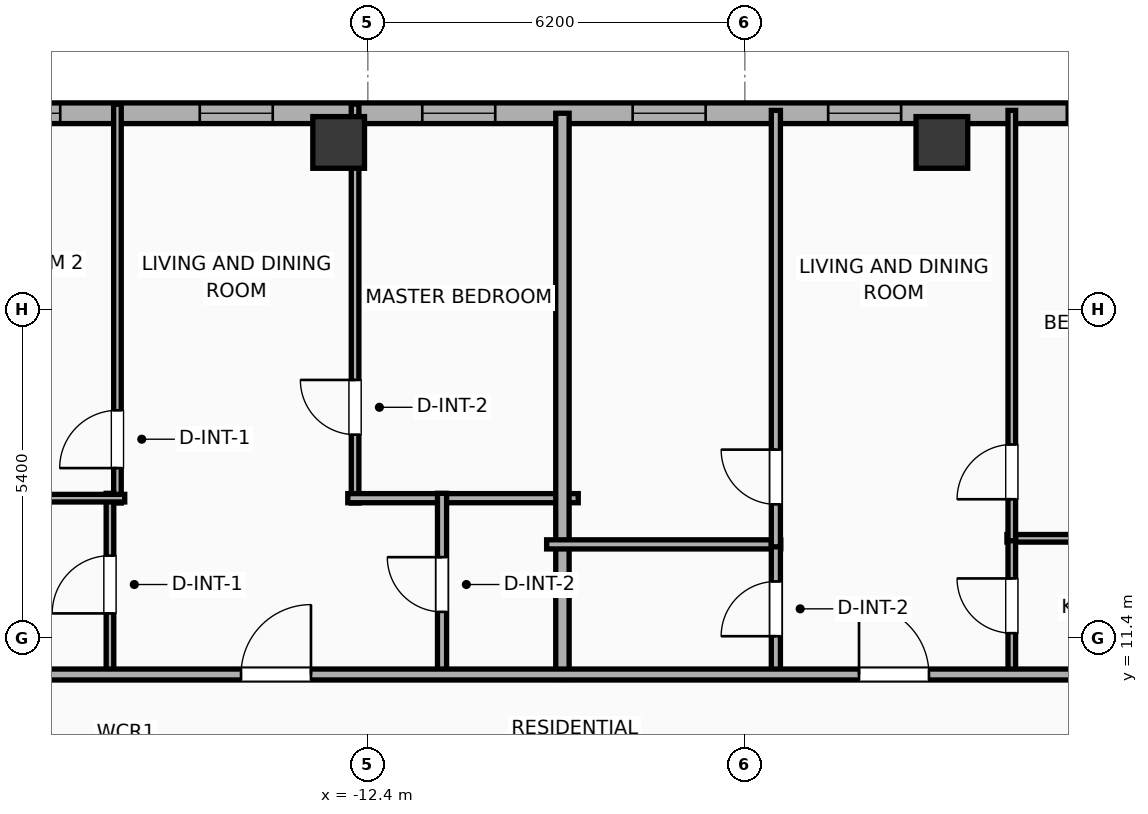
"""IFC4 building model, lengths in metres.
Left out: names, types, materials, properties, quantities, classifications, styles, units other than length and angle.
Written with IfcOpenShell. Run it as: python <this file> out.ifc"""

import sys

from ifc_helpers import new_model, si_unit, direction, frame, frame_2d, origin, origin_2d, place, context, subcontext, project, spatial, rectangle, hollow_rectangle, extrude, element, fill, save


model = new_model("IFC4")
c1 = context("Model", 3, precision=1e-05, world=origin(), true_north=direction((0.0, 1.0)))
c2 = subcontext(c1, "Body", "Model", "MODEL_VIEW")
j1 = project(units=[si_unit("LENGTHUNIT", "METRE"), si_unit("PLANEANGLEUNIT", "RADIAN")], contexts=[c1])
p1 = place(None, origin())
s1 = spatial("IfcSite", under=j1, at=p1, CompositionType="ELEMENT")
p2 = place(p1, origin())
s2 = spatial("IfcBuilding", under=s1, at=p2, CompositionType="ELEMENT")
p3 = place(p2, frame((0.0, 0.0, 219.7)))
s3 = spatial("IfcBuildingStorey", under=s2, at=p3, CompositionType="ELEMENT", Elevation=219.7)
for number, where, z_axis, x_axis in (
    (1, (-2.96, 19.55, 0.0), (0.0, 0.0, 1.0), (1.0, 0.0, 0.0)),
    (2, (-12.88, 19.55, 0.0), (0.0, 0.0, 1.0), (1.0, 0.0, 0.0)),
):
    element("IfcColumn", number, at=place(p3, frame(where, z_axis=z_axis, x_axis=x_axis)), inside=s3, PredefinedType="COLUMN", context=c2, shape_type="SweptSolid", body=[
        extrude(hollow_rectangle(XDim=0.85, YDim=0.85, WallThickness=0.028, at=origin_2d()), origin(), (0.0, 0.0, 1.0), 3.9),
    ])
p4 = place(p3, frame((-22.783, 20.03, 0.0), z_axis=(0.0, 0.0, 1.0), x_axis=(1.0, 0.0, 0.0)))
e3 = element("IfcWall", 3, at=p4, inside=s3, PredefinedType="ELEMENTEDWALL", context=c2, shape_type="SweptSolid", body=[
    extrude(rectangle(XDim=49.566, YDim=0.34, at=frame_2d((24.783, 0.0))), origin(), (0.0, 0.0, 1.0), 3.65),
])
p5 = place(p4, frame((40.956, 0.0, 0.75)))
e4 = element("IfcOpeningElement", 4, at=p5, cuts=e3, PredefinedType="OPENING", context=c2, shape_type="SweptSolid", body=[
    extrude(rectangle(XDim=2.4, YDim=2.1, at=frame_2d((1.2, 1.05))), frame((0.0, 0.18, 0.0), z_axis=(0.0, -1.0, 0.0), x_axis=(1.0, 0.0, 0.0)), (0.0, 0.0, 1.0), 0.36),
])
p6 = place(p4, frame((1.437, 0.0, 0.75)))
e5 = element("IfcOpeningElement", 5, at=p6, cuts=e3, PredefinedType="OPENING", context=c2, shape_type="SweptSolid", body=[
    extrude(rectangle(XDim=1.2, YDim=2.05, at=frame_2d((0.6, 1.025))), frame((0.0, 0.18, 0.0), z_axis=(0.0, -1.0, 0.0), x_axis=(1.0, 0.0, 0.0)), (0.0, 0.0, 1.0), 0.36),
])
p7 = place(p4, frame((7.619, 0.0, 0.75)))
e6 = element("IfcOpeningElement", 6, at=p7, cuts=e3, PredefinedType="OPENING", context=c2, shape_type="SweptSolid", body=[
    extrude(rectangle(XDim=1.2, YDim=2.05, at=frame_2d((0.6, 1.025))), frame((0.0, 0.18, 0.0), z_axis=(0.0, -1.0, 0.0), x_axis=(1.0, 0.0, 0.0)), (0.0, 0.0, 1.0), 0.36),
])
p8 = place(p4, frame((4.124, 0.0, 0.75)))
e7 = element("IfcOpeningElement", 7, at=p8, cuts=e3, PredefinedType="OPENING", context=c2, shape_type="SweptSolid", body=[
    extrude(rectangle(XDim=1.2, YDim=2.05, at=frame_2d((0.6, 1.025))), frame((0.0, 0.18, 0.0), z_axis=(0.0, -1.0, 0.0), x_axis=(1.0, 0.0, 0.0)), (0.0, 0.0, 1.0), 0.36),
])
p9 = place(p4, frame((11.278, 0.0, 0.75)))
e8 = element("IfcOpeningElement", 8, at=p9, cuts=e3, PredefinedType="OPENING", context=c2, shape_type="SweptSolid", body=[
    extrude(rectangle(XDim=1.2, YDim=2.05, at=frame_2d((0.6, 1.025))), frame((0.0, 0.18, 0.0), z_axis=(0.0, -1.0, 0.0), x_axis=(1.0, 0.0, 0.0)), (0.0, 0.0, 1.0), 0.36),
])
p10 = place(p4, frame((17.953, 0.0, 0.75)))
e9 = element("IfcOpeningElement", 9, at=p10, cuts=e3, PredefinedType="OPENING", context=c2, shape_type="SweptSolid", body=[
    extrude(rectangle(XDim=1.2, YDim=2.05, at=frame_2d((0.6, 1.025))), frame((0.0, 0.18, 0.0), z_axis=(0.0, -1.0, 0.0), x_axis=(1.0, 0.0, 0.0)), (0.0, 0.0, 1.0), 0.36),
])
p11 = place(p4, frame((14.738, 0.0, 0.75)))
e10 = element("IfcOpeningElement", 10, at=p11, cuts=e3, PredefinedType="OPENING", context=c2, shape_type="SweptSolid", body=[
    extrude(rectangle(XDim=1.2, YDim=2.05, at=frame_2d((0.6, 1.025))), frame((0.0, 0.18, 0.0), z_axis=(0.0, -1.0, 0.0), x_axis=(1.0, 0.0, 0.0)), (0.0, 0.0, 1.0), 0.36),
])
p12 = place(p4, frame((21.878, 0.0, 0.75)))
e11 = element("IfcOpeningElement", 11, at=p12, cuts=e3, PredefinedType="OPENING", context=c2, shape_type="SweptSolid", body=[
    extrude(rectangle(XDim=1.2, YDim=2.05, at=frame_2d((0.6, 1.025))), frame((0.0, 0.18, 0.0), z_axis=(0.0, -1.0, 0.0), x_axis=(1.0, 0.0, 0.0)), (0.0, 0.0, 1.0), 0.36),
])
p13 = place(p4, frame((27.878, 0.0, 0.75)))
e12 = element("IfcOpeningElement", 12, at=p13, cuts=e3, PredefinedType="OPENING", context=c2, shape_type="SweptSolid", body=[
    extrude(rectangle(XDim=1.2, YDim=2.05, at=frame_2d((0.6, 1.025))), frame((0.0, 0.18, 0.0), z_axis=(0.0, -1.0, 0.0), x_axis=(1.0, 0.0, 0.0)), (0.0, 0.0, 1.0), 0.36),
])
p14 = place(p4, frame((24.863, 0.0, 0.75)))
e13 = element("IfcOpeningElement", 13, at=p14, cuts=e3, PredefinedType="OPENING", context=c2, shape_type="SweptSolid", body=[
    extrude(rectangle(XDim=1.2, YDim=2.05, at=frame_2d((0.6, 1.025))), frame((0.0, 0.18, 0.0), z_axis=(0.0, -1.0, 0.0), x_axis=(1.0, 0.0, 0.0)), (0.0, 0.0, 1.0), 0.36),
])
p15 = place(p4, frame((32.078, 0.0, 0.75)))
e14 = element("IfcOpeningElement", 14, at=p15, cuts=e3, PredefinedType="OPENING", context=c2, shape_type="SweptSolid", body=[
    extrude(rectangle(XDim=1.2, YDim=2.05, at=frame_2d((0.6, 1.025))), frame((0.0, 0.18, 0.0), z_axis=(0.0, -1.0, 0.0), x_axis=(1.0, 0.0, 0.0)), (0.0, 0.0, 1.0), 0.36),
])
p16 = place(p4, frame((35.216, 0.0, 0.75)))
e15 = element("IfcOpeningElement", 15, at=p16, cuts=e3, PredefinedType="OPENING", context=c2, shape_type="SweptSolid", body=[
    extrude(rectangle(XDim=1.2, YDim=2.05, at=frame_2d((0.6, 1.025))), frame((0.0, 0.18, 0.0), z_axis=(0.0, -1.0, 0.0), x_axis=(1.0, 0.0, 0.0)), (0.0, 0.0, 1.0), 0.36),
])
p17 = place(p4, frame((45.73, 0.0, 0.75)))
e16 = element("IfcOpeningElement", 16, at=p17, cuts=e3, PredefinedType="OPENING", context=c2, shape_type="SweptSolid", body=[
    extrude(rectangle(XDim=1.2, YDim=2.05, at=frame_2d((0.6, 1.025))), frame((0.0, 0.18, 0.0), z_axis=(0.0, -1.0, 0.0), x_axis=(1.0, 0.0, 0.0)), (0.0, 0.0, 1.0), 0.36),
])
p18 = place(p3, frame((-16.518, 13.62, 0.0), z_axis=(0.0, 0.0, 1.0), x_axis=(0.0, 1.0, 0.0)))
e17 = element("IfcWall", 17, at=p18, inside=s3, PredefinedType="PARTITIONING", context=c2, shape_type="SweptSolid", body=[
    extrude(rectangle(XDim=6.56, YDim=0.125, at=frame_2d((3.28, 0.0))), origin(), (0.0, 0.0, 1.0), 3.65),
])
p19 = place(p18, frame((0.575, 0.0, 0.0)))
e18 = element("IfcOpeningElement", 18, at=p19, cuts=e17, PredefinedType="OPENING", context=c2, shape_type="SweptSolid", body=[
    extrude(rectangle(XDim=0.95, YDim=2.05, at=frame_2d((0.475, 1.025))), frame((0.0, 0.073, 0.0), z_axis=(0.0, -1.0, 0.0), x_axis=(1.0, 0.0, 0.0)), (0.0, 0.0, 1.0), 0.145),
])
p20 = place(p3, frame((-12.61, 13.62, 0.0), z_axis=(0.0, 0.0, 1.0), x_axis=(0.0, 1.0, 0.0)))
e19 = element("IfcWall", 19, at=p20, inside=s3, PredefinedType="PARTITIONING", context=c2, shape_type="SweptSolid", body=[
    extrude(rectangle(XDim=6.56, YDim=0.125, at=frame_2d((3.28, 0.0))), origin(), (0.0, 0.0, 1.0), 3.09),
])
p21 = place(p20, frame((1.125, 0.0, 0.0)))
e20 = element("IfcOpeningElement", 20, at=p21, cuts=e19, PredefinedType="OPENING", context=c2, shape_type="SweptSolid", body=[
    extrude(rectangle(XDim=0.9, YDim=2.05, at=frame_2d((0.45, 1.025))), frame((0.0, 0.073, 0.0), z_axis=(0.0, -1.0, 0.0), x_axis=(1.0, 0.0, 0.0)), (0.0, 0.0, 1.0), 0.145),
])
p22 = place(p3, frame((-12.73, 13.7, 0.0), z_axis=(0.0, 0.0, 1.0), x_axis=(1.0, 0.0, 0.0)))
e21 = element("IfcWall", 21, at=p22, inside=s3, PredefinedType="PLUMBINGWALL", context=c2, shape_type="SweptSolid", body=[
    extrude(rectangle(XDim=3.79, YDim=0.15, at=frame_2d((1.895, 0.0))), origin(), (0.0, 0.0, 1.0), 3.65),
])
p23 = place(p3, frame((-16.641, 10.78, 0.0), z_axis=(0.0, 0.0, 1.0), x_axis=(0.0, 1.0, 0.0)))
e22 = element("IfcWall", 22, at=p23, inside=s3, PredefinedType="PARTITIONING", context=c2, shape_type="SweptSolid", body=[
    extrude(rectangle(XDim=3.0, YDim=0.125, at=frame_2d((1.5, 0.0))), origin(), (0.0, 0.0, 1.0), 3.65),
])
p24 = place(p23, frame((1.025, 0.0, 0.0)))
e23 = element("IfcOpeningElement", 23, at=p24, cuts=e22, PredefinedType="OPENING", context=c2, shape_type="SweptSolid", body=[
    extrude(rectangle(XDim=0.95, YDim=2.05, at=frame_2d((0.475, 1.025))), frame((0.0, 0.073, 0.0), z_axis=(0.0, -1.0, 0.0), x_axis=(1.0, 0.0, 0.0)), (0.0, 0.0, 1.0), 0.145),
])
p25 = place(p3, frame((-19.86, 13.7, 0.0), z_axis=(0.0, 0.0, 1.0), x_axis=(1.0, 0.0, 0.0)))
e24 = element("IfcWall", 24, at=p25, inside=s3, PredefinedType="PARTITIONING", context=c2, shape_type="SweptSolid", body=[
    extrude(rectangle(XDim=3.462, YDim=0.125, at=frame_2d((1.731, 0.0))), origin(), (0.0, 0.0, 1.0), 3.65),
])
p26 = place(p3, frame((-11.18, 10.78, 0.0), z_axis=(0.0, 0.0, 1.0), x_axis=(0.0, 1.0, 0.0)))
e25 = element("IfcWall", 25, at=p26, inside=s3, PredefinedType="PLUMBINGWALL", context=c2, shape_type="SweptSolid", body=[
    extrude(rectangle(XDim=3.0, YDim=0.15, at=frame_2d((1.5, 0.0))), origin(), (0.0, 0.0, 1.0), 3.65),
])
p27 = place(p26, frame((1.05, 0.0, 0.0)))
e26 = element("IfcOpeningElement", 26, at=p27, cuts=e25, PredefinedType="OPENING", context=c2, shape_type="SweptSolid", body=[
    extrude(rectangle(XDim=0.9, YDim=2.05, at=frame_2d((0.45, 1.025))), frame((0.0, 0.085, 0.0), z_axis=(0.0, -1.0, 0.0), x_axis=(1.0, 0.0, 0.0)), (0.0, 0.0, 1.0), 0.17),
])
p28 = place(p3, frame((-9.2, 10.72, 0.0), z_axis=(0.0, 0.0, 1.0), x_axis=(0.0, 1.0, 0.0)))
e27 = element("IfcWall", 27, at=p28, inside=s3, PredefinedType="PARTITIONING", context=c2, shape_type="SweptSolid", body=[
    extrude(rectangle(XDim=9.31, YDim=0.22, at=frame_2d((4.655, 0.0))), origin(), (0.0, 0.0, 1.0), 3.65),
])
p29 = place(p3, frame((-9.46, 12.94, 0.0), z_axis=(0.0, 0.0, 1.0), x_axis=(1.0, 0.0, 0.0)))
e28 = element("IfcWall", 28, at=p29, inside=s3, PredefinedType="PLUMBINGWALL", context=c2, shape_type="SweptSolid", body=[
    extrude(rectangle(XDim=3.85, YDim=0.15, at=frame_2d((1.925, 0.0))), origin(), (0.0, 0.0, 1.0), 3.65),
])
p30 = place(p3, frame((-1.89, 13.04, 0.0), z_axis=(0.0, 0.0, 1.0), x_axis=(1.0, 0.0, 0.0)))
e29 = element("IfcWall", 29, at=p30, inside=s3, PredefinedType="PARTITIONING", context=c2, shape_type="SweptSolid", body=[
    extrude(rectangle(XDim=3.35, YDim=0.125, at=frame_2d((1.675, 0.0))), origin(), (0.0, 0.0, 1.0), 3.65),
])
p31 = place(p3, frame((-5.69, 10.78, 0.0), z_axis=(0.0, 0.0, 1.0), x_axis=(0.0, 1.0, 0.0)))
e30 = element("IfcWall", 30, at=p31, inside=s3, PredefinedType="PLUMBINGWALL", context=c2, shape_type="SweptSolid", body=[
    extrude(rectangle(XDim=2.2, YDim=0.15, at=frame_2d((1.1, 0.0))), origin(), (0.0, 0.0, 1.0), 3.65),
])
p32 = place(p31, frame((0.65, 0.0, 0.0)))
e31 = element("IfcOpeningElement", 31, at=p32, cuts=e30, PredefinedType="OPENING", context=c2, shape_type="SweptSolid", body=[
    extrude(rectangle(XDim=0.9, YDim=2.05, at=frame_2d((0.45, 1.025))), frame((0.0, 0.085, 0.0), z_axis=(0.0, -1.0, 0.0), x_axis=(1.0, 0.0, 0.0)), (0.0, 0.0, 1.0), 0.17),
])
p33 = place(p3, frame((-5.69, 12.9, 0.0), z_axis=(0.0, 0.0, 1.0), x_axis=(0.0, 1.0, 0.0)))
e32 = element("IfcWall", 32, at=p33, inside=s3, PredefinedType="PLUMBINGWALL", context=c2, shape_type="SweptSolid", body=[
    extrude(rectangle(XDim=7.177, YDim=0.15, at=frame_2d((3.588, 0.0))), origin(), (0.0, 0.0, 1.0), 3.65),
])
p34 = place(p33, frame((0.698, 0.0, 0.0)))
e33 = element("IfcOpeningElement", 33, at=p34, cuts=e32, PredefinedType="OPENING", context=c2, shape_type="SweptSolid", body=[
    extrude(rectangle(XDim=0.9, YDim=2.05, at=frame_2d((0.45, 1.025))), frame((0.0, 0.085, 0.0), z_axis=(0.0, -1.0, 0.0), x_axis=(1.0, 0.0, 0.0)), (0.0, 0.0, 1.0), 0.17),
])
p35 = place(p3, frame((-1.81, 10.78, 0.0), z_axis=(0.0, 0.0, 1.0), x_axis=(0.0, 1.0, 0.0)))
e34 = element("IfcWall", 34, at=p35, inside=s3, PredefinedType="PARTITIONING", context=c2, shape_type="SweptSolid", body=[
    extrude(rectangle(XDim=2.3, YDim=0.125, at=frame_2d((1.15, 0.0))), origin(), (0.0, 0.0, 1.0), 3.65),
])
p36 = place(p35, frame((0.7, 0.0, 0.0)))
e35 = element("IfcOpeningElement", 35, at=p36, cuts=e34, PredefinedType="OPENING", context=c2, shape_type="SweptSolid", body=[
    extrude(rectangle(XDim=0.9, YDim=2.05, at=frame_2d((0.45, 1.025))), frame((0.0, 0.073, 0.0), z_axis=(0.0, -1.0, 0.0), x_axis=(1.0, 0.0, 0.0)), (0.0, 0.0, 1.0), 0.145),
])
p37 = place(p3, frame((-1.81, 13.0, 0.0), z_axis=(0.0, 0.0, 1.0), x_axis=(0.0, 1.0, 0.0)))
e36 = element("IfcWall", 36, at=p37, inside=s3, PredefinedType="PARTITIONING", context=c2, shape_type="SweptSolid", body=[
    extrude(rectangle(XDim=7.077, YDim=0.125, at=frame_2d((3.539, 0.0))), origin(), (0.0, 0.0, 1.0), 3.65),
])
p38 = place(p37, frame((0.682, 0.0, 0.0)))
e37 = element("IfcOpeningElement", 37, at=p38, cuts=e36, PredefinedType="OPENING", context=c2, shape_type="SweptSolid", body=[
    extrude(rectangle(XDim=0.9, YDim=2.05, at=frame_2d((0.45, 1.025))), frame((0.0, 0.073, 0.0), z_axis=(0.0, -1.0, 0.0), x_axis=(1.0, 0.0, 0.0)), (0.0, 0.0, 1.0), 0.145),
])
p39 = place(p3, frame((-26.23, 10.8, 0.0), z_axis=(0.0, 0.0, 1.0), x_axis=(1.0, 0.0, 0.0)))
e38 = element("IfcWall", 38, at=p39, inside=s3, PredefinedType="PARTITIONING", context=c2, shape_type="SweptSolid", body=[
    extrude(rectangle(XDim=56.46, YDim=0.18, at=frame_2d((28.23, 0.0))), origin(), (0.0, 0.0, 1.0), 3.65),
])
p40 = place(p39, frame((2.994, 0.0, 0.0)))
e39 = element("IfcOpeningElement", 39, at=p40, cuts=e38, PredefinedType="OPENING", context=c2, shape_type="SweptSolid", body=[
    extrude(rectangle(XDim=0.9, YDim=2.05, at=frame_2d((0.45, 1.025))), frame((0.0, 0.1, 0.0), z_axis=(0.0, -1.0, 0.0), x_axis=(1.0, 0.0, 0.0)), (0.0, 0.0, 1.0), 0.2),
])
p41 = place(p39, frame((11.745, 0.0, 0.0)))
e40 = element("IfcOpeningElement", 40, at=p41, cuts=e38, PredefinedType="OPENING", context=c2, shape_type="SweptSolid", body=[
    extrude(rectangle(XDim=1.15, YDim=2.05, at=frame_2d((0.575, 1.025))), frame((0.0, 0.1, 0.0), z_axis=(0.0, -1.0, 0.0), x_axis=(1.0, 0.0, 0.0)), (0.0, 0.0, 1.0), 0.2),
])
p42 = place(p39, frame((21.907, 0.0, 0.0)))
e41 = element("IfcOpeningElement", 41, at=p42, cuts=e38, PredefinedType="OPENING", context=c2, shape_type="SweptSolid", body=[
    extrude(rectangle(XDim=1.15, YDim=2.05, at=frame_2d((0.575, 1.025))), frame((0.0, 0.1, 0.0), z_axis=(0.0, -1.0, 0.0), x_axis=(1.0, 0.0, 0.0)), (0.0, 0.0, 1.0), 0.2),
])
p43 = place(p39, frame((32.516, 0.0, 0.0)))
e42 = element("IfcOpeningElement", 42, at=p43, cuts=e38, PredefinedType="OPENING", context=c2, shape_type="SweptSolid", body=[
    extrude(rectangle(XDim=1.15, YDim=2.05, at=frame_2d((0.575, 1.025))), frame((0.0, 0.1, 0.0), z_axis=(0.0, -1.0, 0.0), x_axis=(1.0, 0.0, 0.0)), (0.0, 0.0, 1.0), 0.2),
])
p44 = place(p39, frame((41.956, 0.0, 0.0)))
e43 = element("IfcOpeningElement", 43, at=p44, cuts=e38, PredefinedType="OPENING", context=c2, shape_type="SweptSolid", body=[
    extrude(rectangle(XDim=1.15, YDim=2.05, at=frame_2d((0.575, 1.025))), frame((0.0, 0.1, 0.0), z_axis=(0.0, -1.0, 0.0), x_axis=(1.0, 0.0, 0.0)), (0.0, 0.0, 1.0), 0.2),
])
p45 = place(p39, frame((51.656, 0.0, 0.0)))
e44 = element("IfcOpeningElement", 44, at=p45, cuts=e38, PredefinedType="OPENING", context=c2, shape_type="SweptSolid", body=[
    extrude(rectangle(XDim=1.15, YDim=2.05, at=frame_2d((0.575, 1.025))), frame((0.0, 0.1, 0.0), z_axis=(0.0, -1.0, 0.0), x_axis=(1.0, 0.0, 0.0)), (0.0, 0.0, 1.0), 0.2),
])
p46 = place(p7, origin())
e45 = element("IfcWindow", 45, at=p46, inside=s3, PartitioningType="SINGLE_PANEL", PredefinedType="WINDOW", context=c2, shape_type="SweptSolid", body=[
    extrude(rectangle(XDim=1.2, YDim=2.05, at=frame_2d((0.6, 1.025))), frame((0.0, 0.03, 0.0), z_axis=(0.0, -1.0, 0.0), x_axis=(1.0, 0.0, 0.0)), (0.0, 0.0, 1.0), 0.06),
])
fill(e6, e45)
p47 = place(p8, origin())
e46 = element("IfcWindow", 46, at=p47, inside=s3, PartitioningType="SINGLE_PANEL", PredefinedType="WINDOW", context=c2, shape_type="SweptSolid", body=[
    extrude(rectangle(XDim=1.2, YDim=2.05, at=frame_2d((0.6, 1.025))), frame((0.0, 0.03, 0.0), z_axis=(0.0, -1.0, 0.0), x_axis=(1.0, 0.0, 0.0)), (0.0, 0.0, 1.0), 0.06),
])
fill(e7, e46)
p48 = place(p9, origin())
e47 = element("IfcWindow", 47, at=p48, inside=s3, PartitioningType="SINGLE_PANEL", PredefinedType="WINDOW", context=c2, shape_type="SweptSolid", body=[
    extrude(rectangle(XDim=1.2, YDim=2.05, at=frame_2d((0.6, 1.025))), frame((0.0, 0.03, 0.0), z_axis=(0.0, -1.0, 0.0), x_axis=(1.0, 0.0, 0.0)), (0.0, 0.0, 1.0), 0.06),
])
fill(e8, e47)
p49 = place(p10, origin())
e48 = element("IfcWindow", 48, at=p49, inside=s3, PartitioningType="SINGLE_PANEL", PredefinedType="WINDOW", context=c2, shape_type="SweptSolid", body=[
    extrude(rectangle(XDim=1.2, YDim=2.05, at=frame_2d((0.6, 1.025))), frame((0.0, 0.03, 0.0), z_axis=(0.0, -1.0, 0.0), x_axis=(1.0, 0.0, 0.0)), (0.0, 0.0, 1.0), 0.06),
])
fill(e9, e48)
p50 = place(p11, origin())
e49 = element("IfcWindow", 49, at=p50, inside=s3, PartitioningType="SINGLE_PANEL", PredefinedType="WINDOW", context=c2, shape_type="SweptSolid", body=[
    extrude(rectangle(XDim=1.2, YDim=2.05, at=frame_2d((0.6, 1.025))), frame((0.0, 0.03, 0.0), z_axis=(0.0, -1.0, 0.0), x_axis=(1.0, 0.0, 0.0)), (0.0, 0.0, 1.0), 0.06),
])
fill(e10, e49)
p51 = place(p12, origin())
e50 = element("IfcWindow", 50, at=p51, inside=s3, PartitioningType="SINGLE_PANEL", PredefinedType="WINDOW", context=c2, shape_type="SweptSolid", body=[
    extrude(rectangle(XDim=1.2, YDim=2.05, at=frame_2d((0.6, 1.025))), frame((0.0, 0.03, 0.0), z_axis=(0.0, -1.0, 0.0), x_axis=(1.0, 0.0, 0.0)), (0.0, 0.0, 1.0), 0.06),
])
fill(e11, e50)
p52 = place(p19, origin())
e51 = element("IfcDoor", 51, at=p52, inside=s3, OperationType="SINGLE_SWING_LEFT", PredefinedType="DOOR", context=c2, shape_type="SweptSolid", body=[
    extrude(rectangle(XDim=0.95, YDim=2.05, at=frame_2d((0.475, 1.025))), frame((0.0, 0.025, 0.0), z_axis=(0.0, -1.0, 0.0), x_axis=(1.0, 0.0, 0.0)), (0.0, 0.0, 1.0), 0.05),
])
fill(e18, e51)
p53 = place(p21, origin())
e52 = element("IfcDoor", 52, at=p53, inside=s3, OperationType="SINGLE_SWING_RIGHT", PredefinedType="DOOR", context=c2, shape_type="SweptSolid", body=[
    extrude(rectangle(XDim=0.9, YDim=2.05, at=frame_2d((0.45, 1.025))), frame((0.0, 0.025, 0.0), z_axis=(0.0, -1.0, 0.0), x_axis=(1.0, 0.0, 0.0)), (0.0, 0.0, 1.0), 0.05),
])
fill(e20, e52)
p54 = place(p24, origin())
e53 = element("IfcDoor", 53, at=p54, inside=s3, OperationType="SINGLE_SWING_LEFT", PredefinedType="DOOR", context=c2, shape_type="SweptSolid", body=[
    extrude(rectangle(XDim=0.95, YDim=2.05, at=frame_2d((0.475, 1.025))), frame((0.0, 0.025, 0.0), z_axis=(0.0, -1.0, 0.0), x_axis=(1.0, 0.0, 0.0)), (0.0, 0.0, 1.0), 0.05),
])
fill(e23, e53)
p55 = place(p27, origin())
e54 = element("IfcDoor", 54, at=p55, inside=s3, OperationType="SINGLE_SWING_RIGHT", PredefinedType="DOOR", context=c2, shape_type="SweptSolid", body=[
    extrude(rectangle(XDim=0.9, YDim=2.05, at=frame_2d((0.45, 1.025))), frame((0.0, 0.025, 0.0), z_axis=(0.0, -1.0, 0.0), x_axis=(1.0, 0.0, 0.0)), (0.0, 0.0, 1.0), 0.05),
])
fill(e26, e54)
p56 = place(p32, origin())
e55 = element("IfcDoor", 55, at=p56, inside=s3, OperationType="SINGLE_SWING_LEFT", PredefinedType="DOOR", context=c2, shape_type="SweptSolid", body=[
    extrude(rectangle(XDim=0.9, YDim=2.05, at=frame_2d((0.45, 1.025))), frame((0.0, 0.025, 0.0), z_axis=(0.0, -1.0, 0.0), x_axis=(1.0, 0.0, 0.0)), (0.0, 0.0, 1.0), 0.05),
])
fill(e31, e55)
p57 = place(p34, origin())
e56 = element("IfcDoor", 56, at=p57, inside=s3, OperationType="SINGLE_SWING_RIGHT", PredefinedType="DOOR", context=c2, shape_type="SweptSolid", body=[
    extrude(rectangle(XDim=0.9, YDim=2.05, at=frame_2d((0.45, 1.025))), frame((0.0, 0.025, 0.0), z_axis=(0.0, -1.0, 0.0), x_axis=(1.0, 0.0, 0.0)), (0.0, 0.0, 1.0), 0.05),
])
fill(e33, e56)
p58 = place(p36, origin())
e57 = element("IfcDoor", 57, at=p58, inside=s3, OperationType="SINGLE_SWING_RIGHT", PredefinedType="DOOR", context=c2, shape_type="SweptSolid", body=[
    extrude(rectangle(XDim=0.9, YDim=2.05, at=frame_2d((0.45, 1.025))), frame((0.0, 0.025, 0.0), z_axis=(0.0, -1.0, 0.0), x_axis=(1.0, 0.0, 0.0)), (0.0, 0.0, 1.0), 0.05),
])
fill(e35, e57)
p59 = place(p38, origin())
e58 = element("IfcDoor", 58, at=p59, inside=s3, OperationType="SINGLE_SWING_LEFT", PredefinedType="DOOR", context=c2, shape_type="SweptSolid", body=[
    extrude(rectangle(XDim=0.9, YDim=2.05, at=frame_2d((0.45, 1.025))), frame((0.0, 0.025, 0.0), z_axis=(0.0, -1.0, 0.0), x_axis=(1.0, 0.0, 0.0)), (0.0, 0.0, 1.0), 0.05),
])
fill(e37, e58)
p60 = place(p41, origin())
e59 = element("IfcDoor", 59, at=p60, inside=s3, OperationType="SINGLE_SWING_RIGHT", PredefinedType="DOOR", context=c2, shape_type="SweptSolid", body=[
    extrude(rectangle(XDim=1.15, YDim=2.05, at=frame_2d((0.575, 1.025))), frame((0.0, 0.025, 0.0), z_axis=(0.0, -1.0, 0.0), x_axis=(1.0, 0.0, 0.0)), (0.0, 0.0, 1.0), 0.05),
])
fill(e40, e59)
p61 = place(p42, origin())
e60 = element("IfcDoor", 60, at=p61, inside=s3, OperationType="SINGLE_SWING_LEFT", PredefinedType="DOOR", context=c2, shape_type="SweptSolid", body=[
    extrude(rectangle(XDim=1.15, YDim=2.05, at=frame_2d((0.575, 1.025))), frame((0.0, 0.025, 0.0), z_axis=(0.0, -1.0, 0.0), x_axis=(1.0, 0.0, 0.0)), (0.0, 0.0, 1.0), 0.05),
])
fill(e41, e60)
save(model, sys.argv[1])
